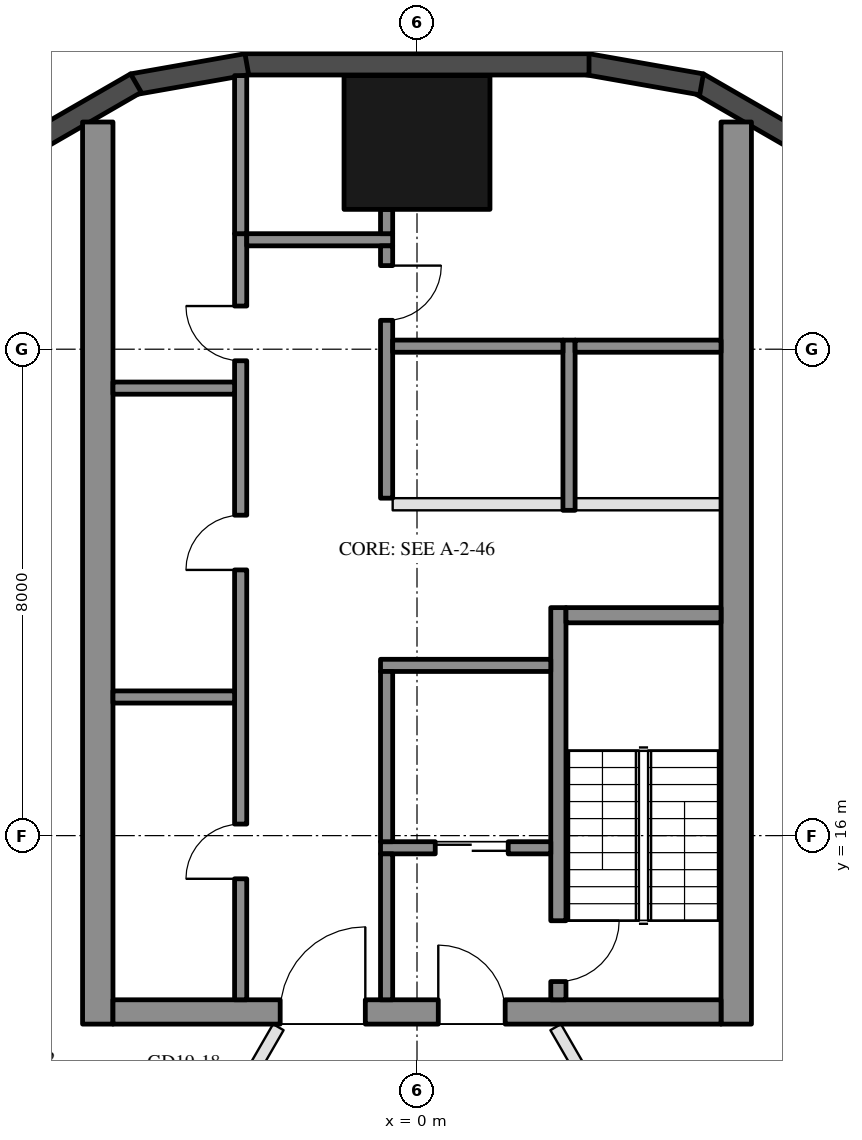
"""IFC4 building model, lengths in metres.
Left out: names, types, materials, properties, quantities, classifications, styles, units other than length and angle.
Written with IfcOpenShell. Run it as: python <this file> out.ifc"""

import sys

from ifc_helpers import new_model, si_unit, direction, frame, frame_2d, origin, origin_2d, place, context, subcontext, project, spatial, rectangle, hollow_rectangle, extrude, element, fill, save


model = new_model("IFC4")
c1 = context("Model", 3, precision=1e-05, world=origin(), true_north=direction((0.0, 1.0)))
c2 = subcontext(c1, "Body", "Model", "MODEL_VIEW")
j1 = project(units=[si_unit("LENGTHUNIT", "METRE"), si_unit("PLANEANGLEUNIT", "RADIAN")], contexts=[c1])
p1 = place(None, origin())
s1 = spatial("IfcSite", under=j1, at=p1, CompositionType="ELEMENT")
p2 = place(p1, origin())
s2 = spatial("IfcBuilding", under=s1, at=p2, CompositionType="ELEMENT")
p3 = place(p2, frame((0.0, 0.0, 202.1)))
s3 = spatial("IfcBuildingStorey", under=s2, at=p3, CompositionType="ELEMENT", Elevation=202.1)
p4 = place(p3, frame((0.0, 27.4, 0.0), z_axis=(0.0, 0.0, 1.0), x_axis=(1.0, 0.0, 0.0)))
e1 = element("IfcColumn", 1, at=p4, inside=s3, PredefinedType="COLUMN", context=c2, shape_type="SweptSolid", body=[
    extrude(hollow_rectangle(XDim=2.4, YDim=2.2, WallThickness=0.06, at=origin_2d()), origin(), (0.0, 0.0, 1.0), 3.7),
])
for number, where, z_axis, x_axis in (
    (2, (6.277, 27.422, 0.0), (0.0, 0.0, 1.0), (-0.866, 0.5, 0.0)),
    (3, (4.68, 28.356, 0.0), (0.0, 0.0, 1.0), (-0.985, 0.174, 0.0)),
):
    element("IfcWall", number, at=place(p3, frame(where, z_axis=z_axis, x_axis=x_axis)), inside=s3, PredefinedType="SOLIDWALL", context=c2, shape_type="SweptSolid", body=[
        extrude(rectangle(XDim=1.91, YDim=0.35, at=frame_2d((0.955, 0.0))), origin(), (0.0, 0.0, 1.0), 3.55),
    ])
p5 = place(p3, frame((2.829, 28.685, 0.0), z_axis=(0.0, 0.0, 1.0), x_axis=(-1.0, 0.0, 0.0)))
e4 = element("IfcWall", 4, at=p5, inside=s3, PredefinedType="SOLIDWALL", context=c2, shape_type="SweptSolid", body=[
    extrude(rectangle(XDim=5.658, YDim=0.35, at=frame_2d((2.829, 0.0))), origin(), (0.0, 0.0, 1.0), 3.55),
])
for number, where, z_axis, x_axis in (
    (5, (-2.799, 28.688, 0.0), (0.0, 0.0, 1.0), (-0.985, -0.174, 0.0)),
    (6, (-4.623, 28.377, 0.0), (0.0, 0.0, 1.0), (-0.866, -0.5, 0.0)),
):
    element("IfcWall", number, at=place(p3, frame(where, z_axis=z_axis, x_axis=x_axis)), inside=s3, PredefinedType="SOLIDWALL", context=c2, shape_type="SweptSolid", body=[
        extrude(rectangle(XDim=1.91, YDim=0.35, at=frame_2d((0.955, 0.0))), origin(), (0.0, 0.0, 1.0), 3.55),
    ])
for number, where, z_axis, x_axis in (
    (7, (5.25, 12.9, 0.0), (0.0, 0.0, 1.0), (0.0, 1.0, 0.0)),
    (8, (-5.25, 12.9, 0.0), (0.0, 0.0, 1.0), (0.0, 1.0, 0.0)),
):
    element("IfcWall", number, at=place(p3, frame(where, z_axis=z_axis, x_axis=x_axis)), inside=s3, PredefinedType="SHEAR", context=c2, shape_type="SweptSolid", body=[
        extrude(rectangle(XDim=14.837, YDim=0.5, at=frame_2d((7.418, 0.0))), origin(), (0.0, 0.0, 1.0), 3.5),
    ])
p6 = place(p3, frame((5.0, 13.1, 0.0), z_axis=(0.0, 0.0, 1.0), x_axis=(-1.0, 0.0, 0.0)))
e9 = element("IfcWall", 9, at=p6, inside=s3, PredefinedType="SHEAR", context=c2, shape_type="SweptSolid", body=[
    extrude(rectangle(XDim=10.0, YDim=0.4, at=frame_2d((5.0, 0.0))), origin(), (0.0, 0.0, 1.0), 3.5),
])
p7 = place(p6, frame((3.55, 0.0, 0.0)))
e10 = element("IfcOpeningElement", 10, at=p7, cuts=e9, PredefinedType="OPENING", context=c2, shape_type="SweptSolid", body=[
    extrude(rectangle(XDim=1.1, YDim=2.1, at=frame_2d((0.55, 1.05))), frame((0.0, 0.21, 0.0), z_axis=(0.0, -1.0, 0.0), x_axis=(1.0, 0.0, 0.0)), (0.0, 0.0, 1.0), 0.42),
])
p8 = place(p6, frame((5.85, 0.0, 0.0)))
e11 = element("IfcOpeningElement", 11, at=p8, cuts=e9, PredefinedType="OPENING", context=c2, shape_type="SweptSolid", body=[
    extrude(rectangle(XDim=1.4, YDim=2.1, at=frame_2d((0.7, 1.05))), frame((0.0, 0.21, 0.0), z_axis=(0.0, -1.0, 0.0), x_axis=(1.0, 0.0, 0.0)), (0.0, 0.0, 1.0), 0.42),
])
p9 = place(p3, frame((2.325, 13.3, 0.0), z_axis=(0.0, 0.0, 1.0), x_axis=(0.0, 1.0, 0.0)))
e12 = element("IfcWall", 12, at=p9, inside=s3, PredefinedType="SHEAR", context=c2, shape_type="SweptSolid", body=[
    extrude(rectangle(XDim=6.45, YDim=0.25, at=frame_2d((3.225, 0.0))), origin(), (0.0, 0.0, 1.0), 3.5),
])
p10 = place(p9, frame((0.3, 0.0, 0.0)))
e13 = element("IfcOpeningElement", 13, at=p10, cuts=e12, PredefinedType="OPENING", context=c2, shape_type="SweptSolid", body=[
    extrude(rectangle(XDim=1.0, YDim=2.1, at=frame_2d((0.5, 1.05))), frame((0.0, 0.135, 0.0), z_axis=(0.0, -1.0, 0.0), x_axis=(1.0, 0.0, 0.0)), (0.0, 0.0, 1.0), 0.27),
])
p11 = place(p3, frame((5.0, 19.625, 0.0), z_axis=(0.0, 0.0, 1.0), x_axis=(-1.0, 0.0, 0.0)))
e14 = element("IfcWall", 14, at=p11, inside=s3, PredefinedType="SHEAR", context=c2, shape_type="SweptSolid", body=[
    extrude(rectangle(XDim=2.55, YDim=0.25, at=frame_2d((1.275, 0.0))), origin(), (0.0, 0.0, 1.0), 3.5),
])
p12 = place(p3, frame((2.2, 18.8, 0.0), z_axis=(0.0, 0.0, 1.0), x_axis=(-1.0, 0.0, 0.0)))
e15 = element("IfcWall", 15, at=p12, inside=s3, PredefinedType="SHEAR", context=c2, shape_type="SweptSolid", body=[
    extrude(rectangle(XDim=2.8, YDim=0.2, at=frame_2d((1.4, 0.0))), origin(), (0.0, 0.0, 1.0), 3.5),
])
p13 = place(p3, frame((2.2, 15.8, 0.0), z_axis=(0.0, 0.0, 1.0), x_axis=(-1.0, 0.0, 0.0)))
e16 = element("IfcWall", 16, at=p13, inside=s3, PredefinedType="SHEAR", context=c2, shape_type="SweptSolid", body=[
    extrude(rectangle(XDim=2.8, YDim=0.2, at=frame_2d((1.4, 0.0))), origin(), (0.0, 0.0, 1.0), 3.5),
])
p14 = place(p13, frame((0.7, 0.0, 0.0)))
e17 = element("IfcOpeningElement", 17, at=p14, cuts=e16, PredefinedType="OPENING", context=c2, shape_type="SweptSolid", body=[
    extrude(rectangle(XDim=1.2, YDim=2.1, at=frame_2d((0.6, 1.05))), frame((0.0, 0.11, 0.0), z_axis=(0.0, -1.0, 0.0), x_axis=(1.0, 0.0, 0.0)), (0.0, 0.0, 1.0), 0.22),
])
p15 = place(p3, frame((-0.5, 15.9, 0.0), z_axis=(0.0, 0.0, 1.0), x_axis=(0.0, 1.0, 0.0)))
e18 = element("IfcWall", 18, at=p15, inside=s3, PredefinedType="SHEAR", context=c2, shape_type="SweptSolid", body=[
    extrude(rectangle(XDim=2.8, YDim=0.2, at=frame_2d((1.4, 0.0))), origin(), (0.0, 0.0, 1.0), 3.5),
])
p16 = place(p3, frame((-0.5, 13.3, 0.0), z_axis=(0.0, 0.0, 1.0), x_axis=(0.0, 1.0, 0.0)))
e19 = element("IfcWall", 19, at=p16, inside=s3, PredefinedType="SHEAR", context=c2, shape_type="SweptSolid", body=[
    extrude(rectangle(XDim=2.4, YDim=0.2, at=frame_2d((1.2, 0.0))), origin(), (0.0, 0.0, 1.0), 3.5),
])
p17 = place(p3, frame((-2.9, 13.3, 0.0), z_axis=(0.0, 0.0, 1.0), x_axis=(0.0, 1.0, 0.0)))
e20 = element("IfcWall", 20, at=p17, inside=s3, PredefinedType="SHEAR", context=c2, shape_type="SweptSolid", body=[
    extrude(rectangle(XDim=12.6, YDim=0.2, at=frame_2d((6.3, 0.0))), origin(), (0.0, 0.0, 1.0), 3.5),
])
p18 = place(p17, frame((1.99, 0.0, 0.0)))
e21 = element("IfcOpeningElement", 21, at=p18, cuts=e20, PredefinedType="OPENING", context=c2, shape_type="SweptSolid", body=[
    extrude(rectangle(XDim=0.9, YDim=2.1, at=frame_2d((0.45, 1.05))), frame((0.0, 0.11, 0.0), z_axis=(0.0, -1.0, 0.0), x_axis=(1.0, 0.0, 0.0)), (0.0, 0.0, 1.0), 0.22),
])
p19 = place(p17, frame((7.07, 0.0, 0.0)))
e22 = element("IfcOpeningElement", 22, at=p19, cuts=e20, PredefinedType="OPENING", context=c2, shape_type="SweptSolid", body=[
    extrude(rectangle(XDim=0.9, YDim=2.1, at=frame_2d((0.45, 1.05))), frame((0.0, 0.11, 0.0), z_axis=(0.0, -1.0, 0.0), x_axis=(1.0, 0.0, 0.0)), (0.0, 0.0, 1.0), 0.22),
])
p20 = place(p17, frame((10.51, 0.0, 0.0)))
e23 = element("IfcOpeningElement", 23, at=p20, cuts=e20, PredefinedType="OPENING", context=c2, shape_type="SweptSolid", body=[
    extrude(rectangle(XDim=0.9, YDim=2.1, at=frame_2d((0.45, 1.05))), frame((0.0, 0.11, 0.0), z_axis=(0.0, -1.0, 0.0), x_axis=(1.0, 0.0, 0.0)), (0.0, 0.0, 1.0), 0.22),
])
p21 = place(p3, frame((-0.4, 25.8, 0.0), z_axis=(0.0, 0.0, 1.0), x_axis=(-1.0, 0.0, 0.0)))
e24 = element("IfcWall", 24, at=p21, inside=s3, PredefinedType="SHEAR", context=c2, shape_type="SweptSolid", body=[
    extrude(rectangle(XDim=2.4, YDim=0.2, at=frame_2d((1.2, 0.0))), origin(), (0.0, 0.0, 1.0), 3.5),
])
p22 = place(p3, frame((-0.5, 21.55, 0.0), z_axis=(0.0, 0.0, 1.0), x_axis=(0.0, 1.0, 0.0)))
e25 = element("IfcWall", 25, at=p22, inside=s3, PredefinedType="SHEAR", context=c2, shape_type="SweptSolid", body=[
    extrude(rectangle(XDim=4.15, YDim=0.2, at=frame_2d((2.075, 0.0))), origin(), (0.0, 0.0, 1.0), 3.5),
])
p23 = place(p22, frame((2.925, 0.0, 0.0)))
e26 = element("IfcOpeningElement", 26, at=p23, cuts=e25, PredefinedType="OPENING", context=c2, shape_type="SweptSolid", body=[
    extrude(rectangle(XDim=0.9, YDim=2.1, at=frame_2d((0.45, 1.05))), frame((0.0, 0.11, 0.0), z_axis=(0.0, -1.0, 0.0), x_axis=(1.0, 0.0, 0.0)), (0.0, 0.0, 1.0), 0.22),
])
for number, where, z_axis, x_axis in (
    (27, (-3.0, 18.28, 0.0), (0.0, 0.0, 1.0), (-1.0, 0.0, 0.0)),
    (28, (-3.0, 23.36, 0.0), (0.0, 0.0, 1.0), (-1.0, 0.0, 0.0)),
):
    element("IfcWall", number, at=place(p3, frame(where, z_axis=z_axis, x_axis=x_axis)), inside=s3, PredefinedType="SHEAR", context=c2, shape_type="SweptSolid", body=[
        extrude(rectangle(XDim=2.0, YDim=0.2, at=frame_2d((1.0, 0.0))), origin(), (0.0, 0.0, 1.0), 3.5),
    ])
p24 = place(p3, frame((-0.5, 25.9, 0.0), z_axis=(0.0, 0.0, 1.0), x_axis=(0.0, 1.0, 0.0)))
e29 = element("IfcWall", 29, at=p24, inside=s3, PredefinedType="SHEAR", context=c2, shape_type="SweptSolid", body=[
    extrude(rectangle(XDim=0.4, YDim=0.2, at=frame_2d((0.2, 0.0))), origin(), (0.0, 0.0, 1.0), 3.5),
])
p25 = place(p3, frame((-2.9, 25.9, 0.0), z_axis=(0.0, 0.0, 1.0), x_axis=(0.0, 1.0, 0.0)))
e30 = element("IfcWall", 30, at=p25, inside=s3, PredefinedType="SHEAR", context=c2, shape_type="SweptSolid", body=[
    extrude(rectangle(XDim=2.6, YDim=0.2, at=frame_2d((1.3, 0.0))), origin(), (0.0, 0.0, 1.0), 3.5),
])
p26 = place(p3, frame((2.5, 21.35, 0.0), z_axis=(0.0, 0.0, 1.0), x_axis=(0.0, 1.0, 0.0)))
e31 = element("IfcWall", 31, at=p26, inside=s3, PredefinedType="SHEAR", context=c2, shape_type="SweptSolid", body=[
    extrude(rectangle(XDim=2.8, YDim=0.2, at=frame_2d((1.4, 0.0))), origin(), (0.0, 0.0, 1.0), 3.5),
])
p27 = place(p3, frame((5.0, 24.05, 0.0), z_axis=(0.0, 0.0, 1.0), x_axis=(-1.0, 0.0, 0.0)))
e32 = element("IfcWall", 32, at=p27, inside=s3, PredefinedType="SHEAR", context=c2, shape_type="SweptSolid", body=[
    extrude(rectangle(XDim=2.4, YDim=0.2, at=frame_2d((1.2, 0.0))), origin(), (0.0, 0.0, 1.0), 3.5),
])
p28 = place(p3, frame((2.4, 24.05, 0.0), z_axis=(0.0, 0.0, 1.0), x_axis=(-1.0, 0.0, 0.0)))
e33 = element("IfcWall", 33, at=p28, inside=s3, PredefinedType="SHEAR", context=c2, shape_type="SweptSolid", body=[
    extrude(rectangle(XDim=2.8, YDim=0.2, at=frame_2d((1.4, 0.0))), origin(), (0.0, 0.0, 1.0), 3.5),
])
p29 = place(p3, frame((5.0, 21.45, 0.0), z_axis=(0.0, 0.0, 1.0), x_axis=(-1.0, 0.0, 0.0)))
e34 = element("IfcWall", 34, at=p29, inside=s3, PredefinedType="PARTITIONING", context=c2, shape_type="SweptSolid", body=[
    extrude(rectangle(XDim=2.4, YDim=0.2, at=frame_2d((1.2, 0.0))), origin(), (0.0, 0.0, 1.0), 3.5),
])
p30 = place(p3, frame((2.4, 21.45, 0.0), z_axis=(0.0, 0.0, 1.0), x_axis=(-1.0, 0.0, 0.0)))
e35 = element("IfcWall", 35, at=p30, inside=s3, PredefinedType="PARTITIONING", context=c2, shape_type="SweptSolid", body=[
    extrude(rectangle(XDim=2.8, YDim=0.2, at=frame_2d((1.4, 0.0))), origin(), (0.0, 0.0, 1.0), 3.5),
])
p31 = place(p3, frame((14.722, 13.061, 0.0), z_axis=(0.0, 0.0, 1.0), x_axis=(-0.881785716662, -0.471650241059, 0.0)))
e36 = element("IfcWall", 36, at=p31, inside=s3, PredefinedType="PARTITIONING", context=c2, shape_type="SweptSolid", body=[
    extrude(rectangle(XDim=10.986, YDim=0.2, at=frame_2d((5.493, 0.0))), origin(), (0.0, 0.0, 1.0), 2.95),
])
p32 = place(p3, frame((-13.147, 13.989, 0.0), z_axis=(0.0, 0.0, 1.0), x_axis=(0.892898572595, -0.450257858408, 0.0)))
e37 = element("IfcWall", 37, at=p32, inside=s3, PredefinedType="PARTITIONING", context=c2, shape_type="SweptSolid", body=[
    extrude(rectangle(XDim=10.096, YDim=0.2, at=frame_2d((5.048, 0.0))), origin(), (0.0, 0.0, 1.0), 3.06),
])
p33 = place(p3, frame((2.281, 12.85, 0.0), z_axis=(0.0, 0.0, 1.0), x_axis=(0.500003731568, -0.866023249352, 0.0)))
e38 = element("IfcWall", 38, at=p33, inside=s3, PredefinedType="PARTITIONING", context=c2, shape_type="SweptSolid", body=[
    extrude(rectangle(XDim=5.585, YDim=0.2, at=frame_2d((2.792, 0.0))), origin(), (0.0, 0.0, 1.0), 2.95),
])
p34 = place(p33, frame((2.292, 0.0, 0.0)))
e39 = element("IfcOpeningElement", 39, at=p34, cuts=e38, PredefinedType="OPENING", context=c2, shape_type="SweptSolid", body=[
    extrude(rectangle(XDim=1.0, YDim=2.1, at=frame_2d((0.5, 1.05))), frame((0.0, 0.11, 0.0), z_axis=(0.0, -1.0, 0.0), x_axis=(1.0, 0.0, 0.0)), (0.0, 0.0, 1.0), 0.22),
])
p35 = place(p3, frame((-4.172, 9.574, 0.0), z_axis=(0.0, 0.0, 1.0), x_axis=(0.499985062256, 0.866034027923, 0.0)))
e40 = element("IfcWall", 40, at=p35, inside=s3, PredefinedType="PARTITIONING", context=c2, shape_type="SweptSolid", body=[
    extrude(rectangle(XDim=3.782, YDim=0.2, at=frame_2d((1.891, 0.0))), origin(), (0.0, 0.0, 1.0), 2.95),
])
p36 = place(p35, frame((1.391, 0.0, 0.0)))
e41 = element("IfcOpeningElement", 41, at=p36, cuts=e40, PredefinedType="OPENING", context=c2, shape_type="SweptSolid", body=[
    extrude(rectangle(XDim=1.0, YDim=2.1, at=frame_2d((0.5, 1.05))), frame((0.0, 0.11, 0.0), z_axis=(0.0, -1.0, 0.0), x_axis=(1.0, 0.0, 0.0)), (0.0, 0.0, 1.0), 0.22),
])
p37 = place(p14, origin())
e42 = element("IfcDoor", 42, at=p37, inside=s3, OperationType="DOUBLE_DOOR_SLIDING", PredefinedType="DOOR", context=c2, shape_type="SweptSolid", body=[
    extrude(rectangle(XDim=1.2, YDim=2.1, at=frame_2d((0.6, 1.05))), frame((0.0, 0.025, 0.0), z_axis=(0.0, -1.0, 0.0), x_axis=(1.0, 0.0, 0.0)), (0.0, 0.0, 1.0), 0.05),
])
fill(e17, e42)
p38 = place(p18, origin())
e43 = element("IfcDoor", 43, at=p38, inside=s3, OperationType="SINGLE_SWING_LEFT", PredefinedType="DOOR", context=c2, shape_type="SweptSolid", body=[
    extrude(rectangle(XDim=0.9, YDim=2.1, at=frame_2d((0.45, 1.05))), frame((0.0, 0.025, 0.0), z_axis=(0.0, -1.0, 0.0), x_axis=(1.0, 0.0, 0.0)), (0.0, 0.0, 1.0), 0.05),
])
fill(e21, e43)
p39 = place(p19, origin())
e44 = element("IfcDoor", 44, at=p39, inside=s3, OperationType="SINGLE_SWING_LEFT", PredefinedType="DOOR", context=c2, shape_type="SweptSolid", body=[
    extrude(rectangle(XDim=0.9, YDim=2.1, at=frame_2d((0.45, 1.05))), frame((0.0, 0.025, 0.0), z_axis=(0.0, -1.0, 0.0), x_axis=(1.0, 0.0, 0.0)), (0.0, 0.0, 1.0), 0.05),
])
fill(e22, e44)
p40 = place(p20, origin())
e45 = element("IfcDoor", 45, at=p40, inside=s3, OperationType="SINGLE_SWING_RIGHT", PredefinedType="DOOR", context=c2, shape_type="SweptSolid", body=[
    extrude(rectangle(XDim=0.9, YDim=2.1, at=frame_2d((0.45, 1.05))), frame((0.0, 0.025, 0.0), z_axis=(0.0, -1.0, 0.0), x_axis=(1.0, 0.0, 0.0)), (0.0, 0.0, 1.0), 0.05),
])
fill(e23, e45)
p41 = place(p23, frame((0.9, 0.0, 0.0), z_axis=(0.0, 0.0, 1.0), x_axis=(-1.0, 0.0, 0.0)))
e46 = element("IfcDoor", 46, at=p41, inside=s3, OperationType="SINGLE_SWING_LEFT", PredefinedType="DOOR", context=c2, shape_type="SweptSolid", body=[
    extrude(rectangle(XDim=0.9, YDim=2.1, at=frame_2d((0.45, 1.05))), frame((0.0, 0.025, 0.0), z_axis=(0.0, -1.0, 0.0), x_axis=(1.0, 0.0, 0.0)), (0.0, 0.0, 1.0), 0.05),
])
fill(e26, e46)
p42 = place(p7, frame((1.1, 0.0, 0.0), z_axis=(0.0, 0.0, 1.0), x_axis=(-1.0, 0.0, 0.0)))
e47 = element("IfcDoor", 47, at=p42, inside=s3, OperationType="SINGLE_SWING_LEFT", PredefinedType="DOOR", context=c2, shape_type="SweptSolid", body=[
    extrude(rectangle(XDim=1.1, YDim=2.1, at=frame_2d((0.55, 1.05))), frame((0.0, 0.025, 0.0), z_axis=(0.0, -1.0, 0.0), x_axis=(1.0, 0.0, 0.0)), (0.0, 0.0, 1.0), 0.05),
])
fill(e10, e47)
p43 = place(p8, frame((1.4, 0.0, 0.0), z_axis=(0.0, 0.0, 1.0), x_axis=(-1.0, 0.0, 0.0)))
e48 = element("IfcDoor", 48, at=p43, inside=s3, OperationType="DOUBLE_DOOR_SINGLE_SWING", PredefinedType="DOOR", context=c2, shape_type="SweptSolid", body=[
    extrude(rectangle(XDim=1.4, YDim=2.1, at=frame_2d((0.7, 1.05))), frame((0.0, 0.025, 0.0), z_axis=(0.0, -1.0, 0.0), x_axis=(1.0, 0.0, 0.0)), (0.0, 0.0, 1.0), 0.05),
])
fill(e11, e48)
p44 = place(p10, frame((1.0, 0.0, 0.0), z_axis=(0.0, 0.0, 1.0), x_axis=(-1.0, 0.0, 0.0)))
e49 = element("IfcDoor", 49, at=p44, inside=s3, OperationType="SINGLE_SWING_LEFT", PredefinedType="DOOR", context=c2, shape_type="SweptSolid", body=[
    extrude(rectangle(XDim=1.0, YDim=2.1, at=frame_2d((0.5, 1.05))), frame((0.0, 0.025, 0.0), z_axis=(0.0, -1.0, 0.0), x_axis=(1.0, 0.0, 0.0)), (0.0, 0.0, 1.0), 0.05),
])
fill(e13, e49)
save(model, sys.argv[1])
